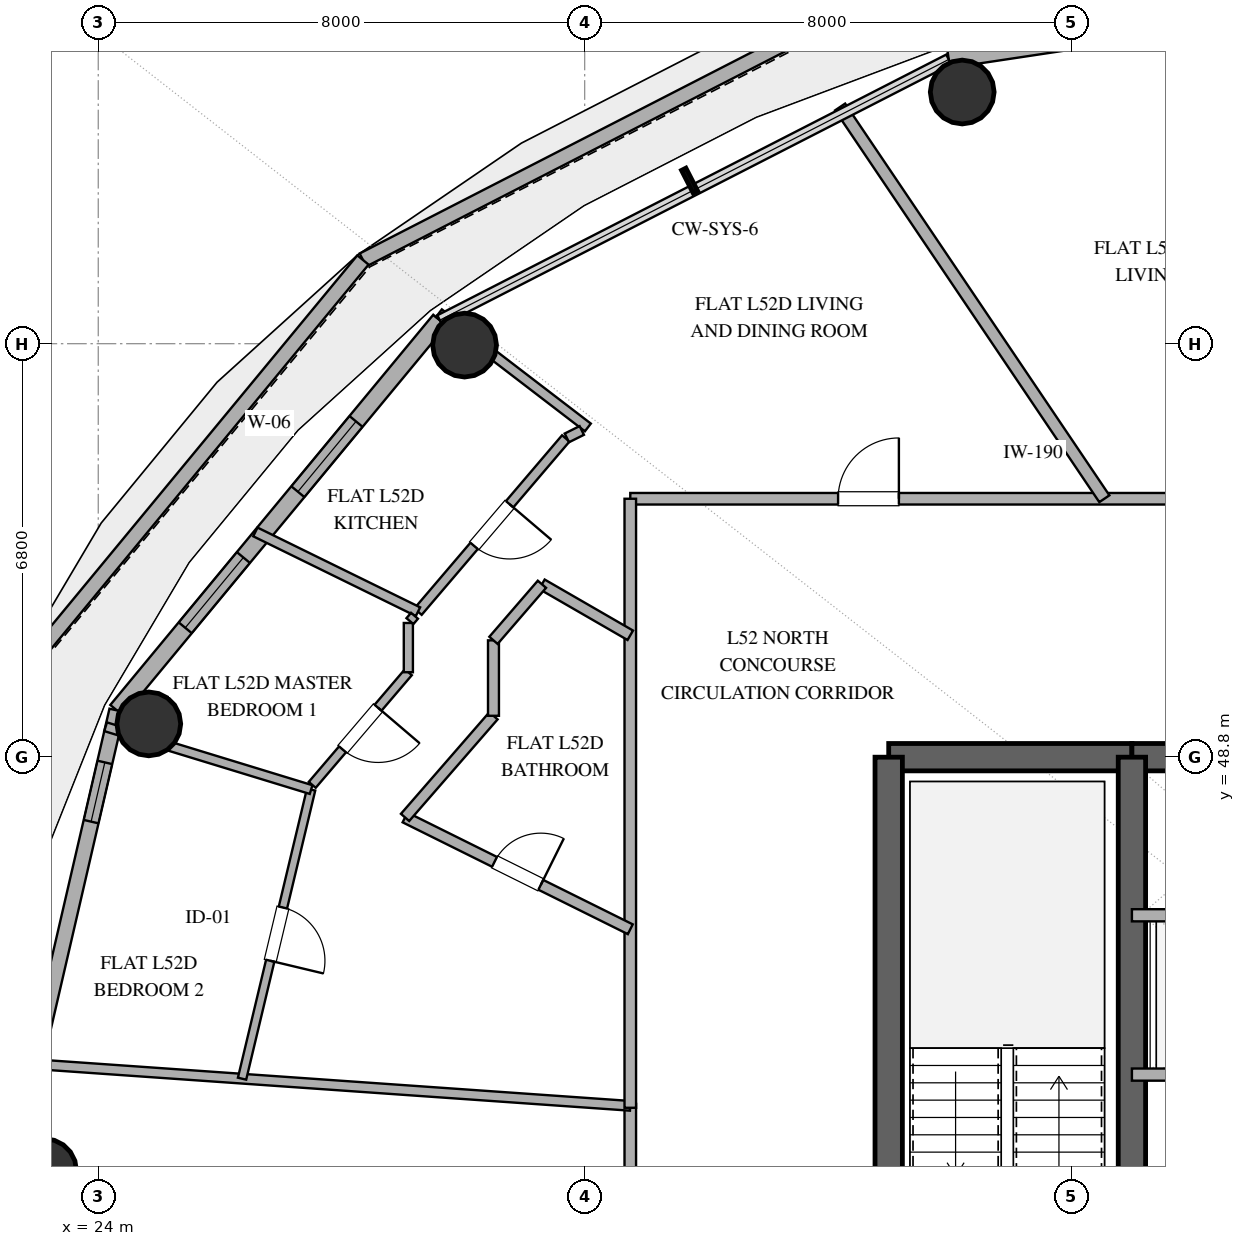
"""IFC4 building model, lengths in metres.
Left out: names, types, materials, properties, quantities, classifications, styles, units other than length and angle.
Written with IfcOpenShell. Run it as: python <this file> out.ifc"""

import sys

from ifc_helpers import new_model, si_unit, direction, frame, frame_2d, origin, origin_2d, place, context, subcontext, project, spatial, rectangle, hollow_circle, extrude, element, fill, save


model = new_model("IFC4")
c1 = context("Model", 3, precision=1e-05, world=origin(), true_north=direction((0.0, 1.0)))
c2 = subcontext(c1, "Body", "Model", "MODEL_VIEW")
j1 = project(units=[si_unit("LENGTHUNIT", "METRE"), si_unit("PLANEANGLEUNIT", "RADIAN")], contexts=[c1])
p1 = place(None, origin())
s1 = spatial("IfcSite", under=j1, at=p1, CompositionType="ELEMENT")
p2 = place(p1, origin())
s2 = spatial("IfcBuilding", under=s1, at=p2, CompositionType="ELEMENT")
p3 = place(p2, frame((0.0, 0.0, 206.4)))
s3 = spatial("IfcBuildingStorey", under=s2, at=p3, CompositionType="ELEMENT", Elevation=206.4)
p4 = place(p3, frame((37.0, 48.8, 0.0), z_axis=(0.0, 0.0, 1.0), x_axis=(1.0, 0.0, 0.0)))
e1 = element("IfcWall", 1, at=p4, inside=s3, PredefinedType="SHEAR", context=c2, shape_type="SweptSolid", body=[
    extrude(rectangle(XDim=4.0, YDim=0.45, at=frame_2d((2.0, 0.0))), origin(), (0.0, 0.0, 1.0), 3.36),
])
p5 = place(p3, frame((41.0, 48.8, 0.0), z_axis=(0.0, 0.0, 1.0), x_axis=(1.0, 0.0, 0.0)))
e2 = element("IfcWall", 2, at=p5, inside=s3, PredefinedType="SHEAR", context=c2, shape_type="SweptSolid", body=[
    extrude(rectangle(XDim=14.0, YDim=0.45, at=frame_2d((7.0, 0.0))), origin(), (0.0, 0.0, 1.0), 3.36),
])
p6 = place(p5, frame((6.1, 0.0, 0.0)))
e3 = element("IfcOpeningElement", 3, at=p6, cuts=e2, PredefinedType="OPENING", context=c2, shape_type="SweptSolid", body=[
    extrude(rectangle(XDim=1.8, YDim=2.25, at=frame_2d((0.9, 1.125))), frame((0.0, 0.235, 0.0), z_axis=(0.0, -1.0, 0.0), x_axis=(1.0, 0.0, 0.0)), (0.0, 0.0, 1.0), 0.47),
])
p7 = place(p3, frame((37.0, 35.2, 0.0), z_axis=(0.0, 0.0, 1.0), x_axis=(0.0, 1.0, 0.0)))
e4 = element("IfcWall", 4, at=p7, inside=s3, PredefinedType="SHEAR", context=c2, shape_type="SweptSolid", body=[
    extrude(rectangle(XDim=13.6, YDim=0.45, at=frame_2d((6.8, 0.0))), origin(), (0.0, 0.0, 1.0), 3.36),
])
p8 = place(p3, frame((41.0, 35.2, 0.0), z_axis=(0.0, 0.0, 1.0), x_axis=(0.0, 1.0, 0.0)))
e5 = element("IfcWall", 5, at=p8, inside=s3, PredefinedType="SHEAR", context=c2, shape_type="SweptSolid", body=[
    extrude(rectangle(XDim=13.6, YDim=0.45, at=frame_2d((6.8, 0.0))), origin(), (0.0, 0.0, 1.0), 3.36),
])
p9 = place(p8, frame((1.15, 0.0, 0.0)))
e6 = element("IfcOpeningElement", 6, at=p9, cuts=e5, PredefinedType="OPENING", context=c2, shape_type="SweptSolid", body=[
    extrude(rectangle(XDim=1.1, YDim=2.2, at=frame_2d((0.55, 1.1))), frame((0.0, 0.235, 0.0), z_axis=(0.0, -1.0, 0.0), x_axis=(1.0, 0.0, 0.0)), (0.0, 0.0, 1.0), 0.47),
])
for number, where, z_axis, x_axis in (
    (7, (38.209, 59.739, 0.0), (0.0, 0.0, 1.0), (1.0, 0.0, 0.0)),
    (8, (30.025, 55.576, 0.0), (0.0, 0.0, 1.0), (1.0, 0.0, 0.0)),
    (9, (24.831, 49.347, 0.0), (0.0, 0.0, 1.0), (1.0, 0.0, 0.0)),
    (10, (23.117, 42.0, 0.0), (0.0, 0.0, 1.0), (1.0, 0.0, 0.0)),
):
    element("IfcColumn", number, at=place(p3, frame(where, z_axis=z_axis, x_axis=x_axis)), inside=s3, PredefinedType="COLUMN", context=c2, shape_type="SweptSolid", body=[
        extrude(hollow_circle(Radius=0.525, WallThickness=0.028, at=origin_2d()), origin(), (0.0, 0.0, 1.0), 3.36),
    ])
p10 = place(p3, frame((37.299, 61.568, 0.0), z_axis=(0.0, 0.0, 1.0), x_axis=(-0.889652072391, -0.456639015077, 0.0)))
e11 = element("IfcWall", 11, at=p10, inside=s3, PredefinedType="PARAPET", context=c2, shape_type="SweptSolid", body=[
    extrude(rectangle(XDim=10.055, YDim=0.24, at=frame_2d((5.027, 0.0))), origin(), (0.0, 0.0, 1.0), 1.25),
])
p11 = place(p3, frame((28.354, 56.977, 0.0), z_axis=(0.0, 0.0, 1.0), x_axis=(-0.636894188862, -0.770951225561, 0.0)))
e12 = element("IfcWall", 12, at=p11, inside=s3, PredefinedType="PARAPET", context=c2, shape_type="SweptSolid", body=[
    extrude(rectangle(XDim=8.913, YDim=0.24, at=frame_2d((4.457, 0.0))), origin(), (0.0, 0.0, 1.0), 1.25),
])
p12 = place(p3, frame((48.0, 61.78, 0.0), z_axis=(0.0, 0.0, 1.0), x_axis=(-0.988882522213, -0.148698881169, 0.0)))
e13 = element("IfcWall", 13, at=p12, inside=s3, PredefinedType="SOLIDWALL", context=c2, shape_type="SweptSolid", body=[
    extrude(rectangle(XDim=10.125, YDim=0.28, at=frame_2d((5.062, 0.0))), origin(), (0.0, 0.0, 1.0), 3.36),
])
p13 = place(p12, frame((1.516, 0.0, 0.0)))
e14 = element("IfcOpeningElement", 14, at=p13, cuts=e13, PredefinedType="OPENING", context=c2, shape_type="SweptSolid", body=[
    extrude(rectangle(XDim=1.4, YDim=2.2, at=frame_2d((0.7, 1.1))), frame((0.0, 0.15, 0.0), z_axis=(0.0, -1.0, 0.0), x_axis=(1.0, 0.0, 0.0)), (0.0, 0.0, 1.0), 0.3),
])
p14 = place(p12, frame((4.322, 0.0, 0.85)))
e15 = element("IfcOpeningElement", 15, at=p14, cuts=e13, PredefinedType="OPENING", context=c2, shape_type="SweptSolid", body=[
    extrude(rectangle(XDim=1.65, YDim=2.0, at=frame_2d((0.825, 1.0))), frame((0.0, 0.15, 0.0), z_axis=(0.0, -1.0, 0.0), x_axis=(1.0, 0.0, 0.0)), (0.0, 0.0, 1.0), 0.3),
])
p15 = place(p12, frame((6.454, 0.0, 0.85)))
e16 = element("IfcOpeningElement", 16, at=p15, cuts=e13, PredefinedType="OPENING", context=c2, shape_type="SweptSolid", body=[
    extrude(rectangle(XDim=1.65, YDim=2.0, at=frame_2d((0.825, 1.0))), frame((0.0, 0.15, 0.0), z_axis=(0.0, -1.0, 0.0), x_axis=(1.0, 0.0, 0.0)), (0.0, 0.0, 1.0), 0.3),
])
p16 = place(p3, frame((29.617, 55.987, 0.0), z_axis=(0.0, 0.0, 1.0), x_axis=(-0.63761509934, -0.770355103243, 0.0)))
e17 = element("IfcWall", 17, at=p16, inside=s3, PredefinedType="SOLIDWALL", context=c2, shape_type="SweptSolid", body=[
    extrude(rectangle(XDim=8.33, YDim=0.28, at=frame_2d((4.165, 0.0))), origin(), (0.0, 0.0, 1.0), 3.36),
])
p17 = place(p16, frame((2.162, 0.0, 0.85)))
e18 = element("IfcOpeningElement", 18, at=p17, cuts=e17, PredefinedType="OPENING", context=c2, shape_type="SweptSolid", body=[
    extrude(rectangle(XDim=1.5, YDim=2.0, at=frame_2d((0.75, 1.0))), frame((0.0, 0.15, 0.0), z_axis=(0.0, -1.0, 0.0), x_axis=(1.0, 0.0, 0.0)), (0.0, 0.0, 1.0), 0.3),
])
p18 = place(p16, frame((5.066, 0.0, 0.85)))
e19 = element("IfcOpeningElement", 19, at=p18, cuts=e17, PredefinedType="OPENING", context=c2, shape_type="SweptSolid", body=[
    extrude(rectangle(XDim=1.5, YDim=1.8, at=frame_2d((0.75, 0.9))), frame((0.0, 0.15, 0.0), z_axis=(0.0, -1.0, 0.0), x_axis=(1.0, 0.0, 0.0)), (0.0, 0.0, 1.0), 0.3),
])
p19 = place(p3, frame((24.306, 49.57, 0.0), z_axis=(0.0, 0.0, 1.0), x_axis=(-0.225635078214, -0.974211892495, 0.0)))
e20 = element("IfcWall", 20, at=p19, inside=s3, PredefinedType="SOLIDWALL", context=c2, shape_type="SweptSolid", body=[
    extrude(rectangle(XDim=7.77, YDim=0.25, at=frame_2d((3.885, 0.0))), origin(), (0.0, 0.0, 1.0), 3.36),
])
p20 = place(p19, frame((0.878, 0.0, 1.42)))
e21 = element("IfcOpeningElement", 21, at=p20, cuts=e20, PredefinedType="OPENING", context=c2, shape_type="SweptSolid", body=[
    extrude(rectangle(XDim=1.0, YDim=1.05, at=frame_2d((0.5, 0.525))), frame((0.0, 0.135, 0.0), z_axis=(0.0, -1.0, 0.0), x_axis=(1.0, 0.0, 0.0)), (0.0, 0.0, 1.0), 0.27),
])
for number, where, z_axis, x_axis in (
    (22, (41.0, 46.2, 0.0), (0.0, 0.0, 1.0), (1.0, 0.0, 0.0)),
    (23, (41.0, 43.58, 0.0), (0.0, 0.0, 1.0), (1.0, 0.0, 0.0)),
):
    element("IfcWall", number, at=place(p3, frame(where, z_axis=z_axis, x_axis=x_axis)), inside=s3, PredefinedType="SOLIDWALL", context=c2, shape_type="SweptSolid", body=[
        extrude(rectangle(XDim=2.95, YDim=0.2, at=frame_2d((1.475, 0.0))), origin(), (0.0, 0.0, 1.0), 2.72),
    ])
p21 = place(p3, frame((32.75, 53.05, 0.0), z_axis=(0.0, 0.0, 1.0), x_axis=(1.0, 0.0, 0.0)))
e24 = element("IfcWall", 24, at=p21, inside=s3, PredefinedType="PARTITIONING", context=c2, shape_type="SweptSolid", body=[
    extrude(rectangle(XDim=13.247, YDim=0.19, at=frame_2d((6.623, 0.0))), origin(), (0.0, 0.0, 1.0), 2.72),
])
p22 = place(p21, frame((3.417, 0.0, 0.0)))
e25 = element("IfcOpeningElement", 25, at=p22, cuts=e24, PredefinedType="OPENING", context=c2, shape_type="SweptSolid", body=[
    extrude(rectangle(XDim=1.0, YDim=2.2, at=frame_2d((0.5, 1.1))), frame((0.0, 0.105, 0.0), z_axis=(0.0, -1.0, 0.0), x_axis=(1.0, 0.0, 0.0)), (0.0, 0.0, 1.0), 0.21),
])
p23 = place(p21, frame((10.002, 0.0, 0.0)))
e26 = element("IfcOpeningElement", 26, at=p23, cuts=e24, PredefinedType="OPENING", context=c2, shape_type="SweptSolid", body=[
    extrude(rectangle(XDim=1.0, YDim=2.2, at=frame_2d((0.5, 1.1))), frame((0.0, 0.105, 0.0), z_axis=(0.0, -1.0, 0.0), x_axis=(1.0, 0.0, 0.0)), (0.0, 0.0, 1.0), 0.21),
])
p24 = place(p3, frame((40.547, 53.05, 0.0), z_axis=(0.0, 0.0, 1.0), x_axis=(-0.559208454265, 0.8290270832, 0.0)))
e27 = element("IfcWall", 27, at=p24, inside=s3, PredefinedType="PARTITIONING", context=c2, shape_type="SweptSolid", body=[
    extrude(rectangle(XDim=7.771, YDim=0.2, at=frame_2d((3.886, 0.0))), origin(), (0.0, 0.0, 1.0), 2.72),
])
p25 = place(p3, frame((32.75, 30.95, 0.0), z_axis=(0.0, 0.0, 1.0), x_axis=(0.0, 1.0, 0.0)))
e28 = element("IfcWall", 28, at=p25, inside=s3, PredefinedType="PARTITIONING", context=c2, shape_type="SweptSolid", body=[
    extrude(rectangle(XDim=12.148, YDim=0.19, at=frame_2d((6.074, 0.0))), origin(), (0.0, 0.0, 1.0), 2.72),
])
p26 = place(p25, frame((3.214, 0.0, 0.0)))
e29 = element("IfcOpeningElement", 29, at=p26, cuts=e28, PredefinedType="OPENING", context=c2, shape_type="SweptSolid", body=[
    extrude(rectangle(XDim=1.0, YDim=2.2, at=frame_2d((0.5, 1.1))), frame((0.0, 0.105, 0.0), z_axis=(0.0, -1.0, 0.0), x_axis=(1.0, 0.0, 0.0)), (0.0, 0.0, 1.0), 0.21),
])
p27 = place(p3, frame((22.839, 43.76, 0.0), z_axis=(0.0, 0.0, 1.0), x_axis=(0.997563620801, -0.069762615023, 0.0)))
e30 = element("IfcWall", 30, at=p27, inside=s3, PredefinedType="PLUMBINGWALL", context=c2, shape_type="SweptSolid", body=[
    extrude(rectangle(XDim=9.935, YDim=0.16, at=frame_2d((4.968, 0.0))), origin(), (0.0, 0.0, 1.0), 2.72),
])
p28 = place(p3, frame((32.75, 43.034, 0.0), z_axis=(0.0, 0.0, 1.0), x_axis=(0.0, 1.0, 0.0)))
e31 = element("IfcWall", 31, at=p28, inside=s3, PredefinedType="PARTITIONING", context=c2, shape_type="SweptSolid", body=[
    extrude(rectangle(XDim=10.016, YDim=0.19, at=frame_2d((5.008, 0.0))), origin(), (0.0, 0.0, 1.0), 2.72),
])
p29 = place(p3, frame((27.5, 48.267, 0.0), z_axis=(0.0, 0.0, 1.0), x_axis=(-0.232297954947, -0.972644673109, 0.0)))
e32 = element("IfcWall", 32, at=p29, inside=s3, PredefinedType="PARTITIONING", context=c2, shape_type="SweptSolid", body=[
    extrude(rectangle(XDim=4.888, YDim=0.14, at=frame_2d((2.444, 0.0))), origin(), (0.0, 0.0, 1.0), 2.72),
])
p30 = place(p29, frame((1.994, 0.0, 0.0)))
e33 = element("IfcOpeningElement", 33, at=p30, cuts=e32, PredefinedType="OPENING", context=c2, shape_type="SweptSolid", body=[
    extrude(rectangle(XDim=0.9, YDim=2.1, at=frame_2d((0.45, 1.05))), frame((0.0, 0.08, 0.0), z_axis=(0.0, -1.0, 0.0), x_axis=(1.0, 0.0, 0.0)), (0.0, 0.0, 1.0), 0.16),
])
p31 = place(p3, frame((29.046, 47.809, 0.0), z_axis=(0.0, 0.0, 1.0), x_axis=(0.895675225239, -0.444708770876, 0.0)))
e34 = element("IfcWall", 34, at=p31, inside=s3, PredefinedType="PLUMBINGWALL", context=c2, shape_type="SweptSolid", body=[
    extrude(rectangle(XDim=4.135, YDim=0.18, at=frame_2d((2.068, 0.0))), origin(), (0.0, 0.0, 1.0), 2.72),
])
p32 = place(p31, frame((1.643, 0.0, 0.0)))
e35 = element("IfcOpeningElement", 35, at=p32, cuts=e34, PredefinedType="OPENING", context=c2, shape_type="SweptSolid", body=[
    extrude(rectangle(XDim=0.85, YDim=2.1, at=frame_2d((0.425, 1.05))), frame((0.0, 0.1, 0.0), z_axis=(0.0, -1.0, 0.0), x_axis=(1.0, 0.0, 0.0)), (0.0, 0.0, 1.0), 0.2),
])
p33 = place(p3, frame((31.689, 54.042, 0.0), z_axis=(0.0, 0.0, 1.0), x_axis=(-0.648996547252, -0.760791352248, 0.0)))
e36 = element("IfcWall", 36, at=p33, inside=s3, PredefinedType="PLUMBINGWALL", context=c2, shape_type="SweptSolid", body=[
    extrude(rectangle(XDim=3.745, YDim=0.16, at=frame_2d((1.873, 0.0))), origin(), (0.0, 0.0, 1.0), 2.72),
])
p34 = place(p33, frame((1.423, 0.0, 0.0)))
e37 = element("IfcOpeningElement", 37, at=p34, cuts=e36, PredefinedType="OPENING", context=c2, shape_type="SweptSolid", body=[
    extrude(rectangle(XDim=0.9, YDim=2.1, at=frame_2d((0.45, 1.05))), frame((0.0, 0.09, 0.0), z_axis=(0.0, -1.0, 0.0), x_axis=(1.0, 0.0, 0.0)), (0.0, 0.0, 1.0), 0.18),
])
p35 = place(p3, frame((27.5, 48.267, 0.0), z_axis=(0.0, 0.0, 1.0), x_axis=(-0.956303289689, 0.292376500647, 0.0)))
e38 = element("IfcWall", 38, at=p35, inside=s3, PredefinedType="PARTITIONING", context=c2, shape_type="SweptSolid", body=[
    extrude(rectangle(XDim=3.534, YDim=0.15, at=frame_2d((1.767, 0.0))), origin(), (0.0, 0.0, 1.0), 2.72),
])
p36 = place(p3, frame((29.603, 56.101, 0.0), z_axis=(0.0, 0.0, 1.0), x_axis=(0.793701828105, -0.608307001491, 0.0)))
e39 = element("IfcWall", 39, at=p36, inside=s3, PredefinedType="PLUMBINGWALL", context=c2, shape_type="SweptSolid", body=[
    extrude(rectangle(XDim=3.087, YDim=0.16, at=frame_2d((1.543, 0.0))), origin(), (0.0, 0.0, 1.0), 2.72),
])
p37 = place(p3, frame((29.258, 51.193, 0.0), z_axis=(0.0, 0.0, 1.0), x_axis=(-0.897810810902, 0.440381366348, 0.0)))
e40 = element("IfcWall", 40, at=p37, inside=s3, PredefinedType="PLUMBINGWALL", context=c2, shape_type="SweptSolid", body=[
    extrude(rectangle(XDim=2.979, YDim=0.16, at=frame_2d((1.489, 0.0))), origin(), (0.0, 0.0, 1.0), 2.72),
])
p38 = place(p3, frame((29.1, 50.197, 0.0), z_axis=(0.0, 0.0, 1.0), x_axis=(-0.649270866973, -0.760557257082, 0.0)))
e41 = element("IfcWall", 41, at=p38, inside=s3, PredefinedType="PARTITIONING", context=c2, shape_type="SweptSolid", body=[
    extrude(rectangle(XDim=2.435, YDim=0.15, at=frame_2d((1.218, 0.0))), origin(), (0.0, 0.0, 1.0), 2.72),
])
p39 = place(p38, frame((0.768, 0.0, 0.0)))
e42 = element("IfcOpeningElement", 42, at=p39, cuts=e41, PredefinedType="OPENING", context=c2, shape_type="SweptSolid", body=[
    extrude(rectangle(XDim=0.9, YDim=2.1, at=frame_2d((0.45, 1.05))), frame((0.0, 0.085, 0.0), z_axis=(0.0, -1.0, 0.0), x_axis=(1.0, 0.0, 0.0)), (0.0, 0.0, 1.0), 0.17),
])
p40 = place(p3, frame((30.5, 49.481, 0.0), z_axis=(0.0, 0.0, 1.0), x_axis=(-0.656364223854, -0.754444169998, 0.0)))
e43 = element("IfcWall", 43, at=p40, inside=s3, PredefinedType="PLUMBINGWALL", context=c2, shape_type="SweptSolid", body=[
    extrude(rectangle(XDim=2.215, YDim=0.18, at=frame_2d((1.108, 0.0))), origin(), (0.0, 0.0, 1.0), 2.72),
])
p41 = place(p3, frame((32.75, 50.805, 0.0), z_axis=(0.0, 0.0, 1.0), x_axis=(-0.866013522419, 0.500020578564, 0.0)))
e44 = element("IfcWall", 44, at=p41, inside=s3, PredefinedType="PLUMBINGWALL", context=c2, shape_type="SweptSolid", body=[
    extrude(rectangle(XDim=1.678, YDim=0.18, at=frame_2d((0.839, 0.0))), origin(), (0.0, 0.0, 1.0), 2.72),
])
p42 = place(p3, frame((30.5, 50.721, 0.0), z_axis=(0.0, 0.0, 1.0), x_axis=(0.0, -1.0, 0.0)))
e45 = element("IfcWall", 45, at=p42, inside=s3, PredefinedType="PLUMBINGWALL", context=c2, shape_type="SweptSolid", body=[
    extrude(rectangle(XDim=1.24, YDim=0.18, at=frame_2d((0.62, 0.0))), origin(), (0.0, 0.0, 1.0), 2.72),
])
p43 = place(p3, frame((31.297, 51.644, 0.0), z_axis=(0.0, 0.0, 1.0), x_axis=(-0.653870108477, -0.756606820773, 0.0)))
e46 = element("IfcWall", 46, at=p43, inside=s3, PredefinedType="PLUMBINGWALL", context=c2, shape_type="SweptSolid", body=[
    extrude(rectangle(XDim=1.219, YDim=0.18, at=frame_2d((0.609, 0.0))), origin(), (0.0, 0.0, 1.0), 2.72),
])
p44 = place(p3, frame((29.1, 51.007, 0.0), z_axis=(0.0, 0.0, 1.0), x_axis=(0.0, -1.0, 0.0)))
e47 = element("IfcWall", 47, at=p44, inside=s3, PredefinedType="PARTITIONING", context=c2, shape_type="SweptSolid", body=[
    extrude(rectangle(XDim=0.81, YDim=0.15, at=frame_2d((0.405, 0.0))), origin(), (0.0, 0.0, 1.0), 2.72),
])
p45 = place(p3, frame((31.952, 54.173, 0.0), z_axis=(0.0, 0.0, 1.0), x_axis=(-0.895316278345, -0.445430984251, 0.0)))
e48 = element("IfcWall", 48, at=p45, inside=s3, PredefinedType="PLUMBINGWALL", context=c2, shape_type="SweptSolid", body=[
    extrude(rectangle(XDim=0.274, YDim=0.16, at=frame_2d((0.137, 0.0))), origin(), (0.0, 0.0, 1.0), 2.72),
])
p46 = place(p3, frame((29.201, 51.126, 0.0), z_axis=(0.0, 0.0, 1.0), x_axis=(-0.649232735888, -0.760589807092, 0.0)))
e49 = element("IfcWall", 49, at=p46, inside=s3, PredefinedType="PARTITIONING", context=c2, shape_type="SweptSolid", body=[
    extrude(rectangle(XDim=0.116, YDim=0.15, at=frame_2d((0.058, 0.0))), origin(), (0.0, 0.0, 1.0), 2.72),
])
p47 = place(p17, origin())
e50 = element("IfcWindow", 50, at=p47, inside=s3, PartitioningType="SINGLE_PANEL", PredefinedType="WINDOW", context=c2, shape_type="SweptSolid", body=[
    extrude(rectangle(XDim=1.5, YDim=2.0, at=frame_2d((0.75, 1.0))), frame((0.0, 0.03, 0.0), z_axis=(0.0, -1.0, 0.0), x_axis=(1.0, 0.0, 0.0)), (0.0, 0.0, 1.0), 0.06),
])
fill(e18, e50)
p48 = place(p18, origin())
e51 = element("IfcWindow", 51, at=p48, inside=s3, PartitioningType="SINGLE_PANEL", PredefinedType="WINDOW", context=c2, shape_type="SweptSolid", body=[
    extrude(rectangle(XDim=1.5, YDim=1.8, at=frame_2d((0.75, 0.9))), frame((0.0, 0.03, 0.0), z_axis=(0.0, -1.0, 0.0), x_axis=(1.0, 0.0, 0.0)), (0.0, 0.0, 1.0), 0.06),
])
fill(e19, e51)
p49 = place(p20, origin())
e52 = element("IfcWindow", 52, at=p49, inside=s3, PartitioningType="SINGLE_PANEL", PredefinedType="WINDOW", context=c2, shape_type="SweptSolid", body=[
    extrude(rectangle(XDim=1.0, YDim=1.05, at=frame_2d((0.5, 0.525))), frame((0.0, 0.03, 0.0), z_axis=(0.0, -1.0, 0.0), x_axis=(1.0, 0.0, 0.0)), (0.0, 0.0, 1.0), 0.06),
])
fill(e21, e52)
p50 = place(p22, origin())
e53 = element("IfcDoor", 53, at=p50, inside=s3, OperationType="SINGLE_SWING_RIGHT", PredefinedType="DOOR", context=c2, shape_type="SweptSolid", body=[
    extrude(rectangle(XDim=1.0, YDim=2.2, at=frame_2d((0.5, 1.1))), frame((0.0, 0.025, 0.0), z_axis=(0.0, -1.0, 0.0), x_axis=(1.0, 0.0, 0.0)), (0.0, 0.0, 1.0), 0.05),
])
fill(e25, e53)
p51 = place(p30, origin())
e54 = element("IfcDoor", 54, at=p51, inside=s3, OperationType="SINGLE_SWING_RIGHT", PredefinedType="DOOR", context=c2, shape_type="SweptSolid", body=[
    extrude(rectangle(XDim=0.9, YDim=2.1, at=frame_2d((0.45, 1.05))), frame((0.0, 0.025, 0.0), z_axis=(0.0, -1.0, 0.0), x_axis=(1.0, 0.0, 0.0)), (0.0, 0.0, 1.0), 0.05),
])
fill(e33, e54)
p52 = place(p32, origin())
e55 = element("IfcDoor", 55, at=p52, inside=s3, OperationType="SINGLE_SWING_RIGHT", PredefinedType="DOOR", context=c2, shape_type="SweptSolid", body=[
    extrude(rectangle(XDim=0.85, YDim=2.1, at=frame_2d((0.425, 1.05))), frame((0.0, 0.025, 0.0), z_axis=(0.0, -1.0, 0.0), x_axis=(1.0, 0.0, 0.0)), (0.0, 0.0, 1.0), 0.05),
])
fill(e35, e55)
p53 = place(p34, origin())
e56 = element("IfcDoor", 56, at=p53, inside=s3, OperationType="SINGLE_SWING_LEFT", PredefinedType="DOOR", context=c2, shape_type="SweptSolid", body=[
    extrude(rectangle(XDim=0.9, YDim=2.1, at=frame_2d((0.45, 1.05))), frame((0.0, 0.025, 0.0), z_axis=(0.0, -1.0, 0.0), x_axis=(1.0, 0.0, 0.0)), (0.0, 0.0, 1.0), 0.05),
])
fill(e37, e56)
p54 = place(p39, origin())
e57 = element("IfcDoor", 57, at=p54, inside=s3, OperationType="SINGLE_SWING_LEFT", PredefinedType="DOOR", context=c2, shape_type="SweptSolid", body=[
    extrude(rectangle(XDim=0.9, YDim=2.1, at=frame_2d((0.45, 1.05))), frame((0.0, 0.025, 0.0), z_axis=(0.0, -1.0, 0.0), x_axis=(1.0, 0.0, 0.0)), (0.0, 0.0, 1.0), 0.05),
])
fill(e42, e57)
save(model, sys.argv[1])
